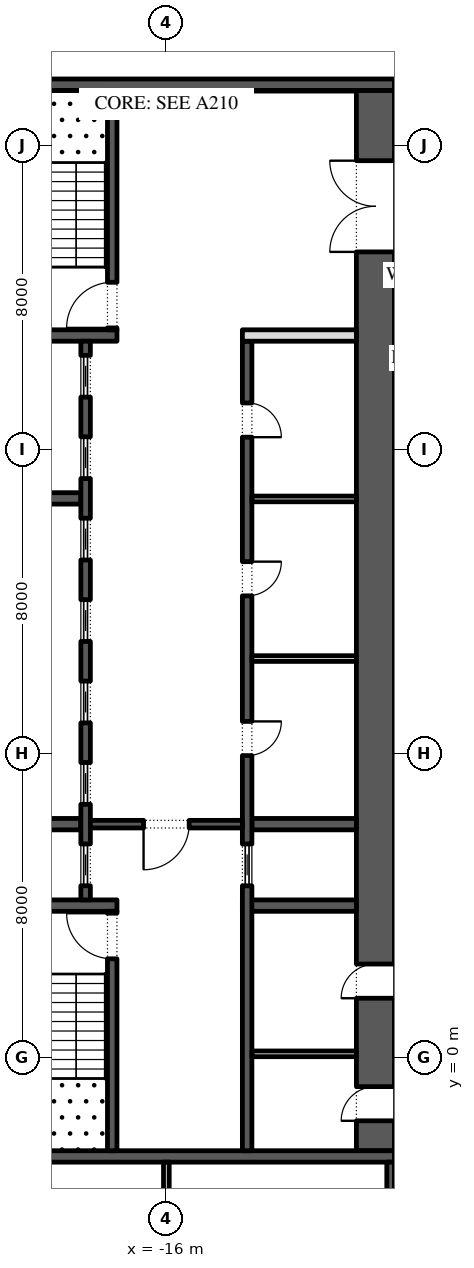
"""IFC4 building model, lengths in metres.
Left out: names, types, materials, properties, quantities, classifications, styles, units other than length and angle.
Written with IfcOpenShell. Run it as: python <this file> out.ifc"""

import sys

from ifc_helpers import new_model, si_unit, direction, frame, frame_2d, origin, place, context, subcontext, project, spatial, rectangle, extrude, element, fill, save


model = new_model("IFC4")
c1 = context("Model", 3, precision=1e-05, world=origin(), true_north=direction((0.0, 1.0)))
c2 = subcontext(c1, "Body", "Model", "MODEL_VIEW")
j1 = project(units=[si_unit("LENGTHUNIT", "METRE"), si_unit("PLANEANGLEUNIT", "RADIAN")], contexts=[c1])
p1 = place(None, origin())
s1 = spatial("IfcSite", under=j1, at=p1, CompositionType="ELEMENT")
p2 = place(p1, origin())
s2 = spatial("IfcBuilding", under=s1, at=p2, CompositionType="ELEMENT")
p3 = place(p2, frame((0.0, 0.0, 39.6)))
s3 = spatial("IfcBuildingStorey", under=s2, at=p3, CompositionType="ELEMENT", Elevation=39.6)
p4 = place(p3, frame((-10.5, -2.45, 0.0), z_axis=(0.0, 0.0, 1.0), x_axis=(0.0, 1.0, 0.0)))
e1 = element("IfcWall", 1, at=p4, inside=s3, PredefinedType="SHEAR", context=c2, shape_type="SweptSolid", body=[
    extrude(rectangle(XDim=27.9, YDim=1.0, at=frame_2d((13.95, 0.0))), origin(), (0.0, 0.0, 1.0), 4.0),
])
p5 = place(p4, frame((23.65, 0.0, 0.0)))
e2 = element("IfcOpeningElement", 2, at=p5, cuts=e1, PredefinedType="OPENING", context=c2, shape_type="SweptSolid", body=[
    extrude(rectangle(XDim=2.4, YDim=2.1, at=frame_2d((1.2, 1.05))), frame((0.0, 0.51, 0.0), z_axis=(0.0, -1.0, 0.0), x_axis=(1.0, 0.0, 0.0)), (0.0, 0.0, 1.0), 1.02),
])
p6 = place(p4, frame((0.788, 0.0, 0.0)))
e3 = element("IfcOpeningElement", 3, at=p6, cuts=e1, PredefinedType="OPENING", context=c2, shape_type="SweptSolid", body=[
    extrude(rectangle(XDim=0.9, YDim=2.1, at=frame_2d((0.45, 1.05))), frame((0.0, 0.51, 0.0), z_axis=(0.0, -1.0, 0.0), x_axis=(1.0, 0.0, 0.0)), (0.0, 0.0, 1.0), 1.02),
])
p7 = place(p4, frame((4.012, 0.0, 0.0)))
e4 = element("IfcOpeningElement", 4, at=p7, cuts=e1, PredefinedType="OPENING", context=c2, shape_type="SweptSolid", body=[
    extrude(rectangle(XDim=0.9, YDim=2.1, at=frame_2d((0.45, 1.05))), frame((0.0, 0.51, 0.0), z_axis=(0.0, -1.0, 0.0), x_axis=(1.0, 0.0, 0.0)), (0.0, 0.0, 1.0), 1.02),
])
for number, where, z_axis, x_axis in (
    (5, (-22.0, -2.6, 0.0), (0.0, 0.0, 1.0), (1.0, 0.0, 0.0)),
    (6, (-22.0, 25.6, 0.0), (0.0, 0.0, 1.0), (1.0, 0.0, 0.0)),
):
    element("IfcWall", number, at=place(p3, frame(where, z_axis=z_axis, x_axis=x_axis)), inside=s3, PredefinedType="SHEAR", context=c2, shape_type="SweptSolid", body=[
        extrude(rectangle(XDim=12.0, YDim=0.3, at=frame_2d((6.0, 0.0))), origin(), (0.0, 0.0, 1.0), 4.0),
    ])
p8 = place(p3, frame((-21.0, 4.0, 0.0), z_axis=(0.0, 0.0, 1.0), x_axis=(1.0, 0.0, 0.0)))
e7 = element("IfcWall", 7, at=p8, inside=s3, PredefinedType="SHEAR", context=c2, shape_type="SweptSolid", body=[
    extrude(rectangle(XDim=3.7, YDim=0.3, at=frame_2d((1.85, 0.0))), origin(), (0.0, 0.0, 1.0), 4.0),
])
p9 = place(p3, frame((-17.425, -2.45, 0.0), z_axis=(0.0, 0.0, 1.0), x_axis=(0.0, 1.0, 0.0)))
e8 = element("IfcWall", 8, at=p9, inside=s3, PredefinedType="SHEAR", context=c2, shape_type="SweptSolid", body=[
    extrude(rectangle(XDim=6.3, YDim=0.25, at=frame_2d((3.15, 0.0))), origin(), (0.0, 0.0, 1.0), 4.0),
])
p10 = place(p9, frame((5.05, 0.0, 0.0)))
e9 = element("IfcOpeningElement", 9, at=p10, cuts=e8, PredefinedType="OPENING", context=c2, shape_type="SweptSolid", body=[
    extrude(rectangle(XDim=1.2, YDim=2.1, at=frame_2d((0.6, 1.05))), frame((0.0, 0.135, 0.0), z_axis=(0.0, -1.0, 0.0), x_axis=(1.0, 0.0, 0.0)), (0.0, 0.0, 1.0), 0.27),
])
p11 = place(p3, frame((-21.0, 19.0, 0.0), z_axis=(0.0, 0.0, 1.0), x_axis=(1.0, 0.0, 0.0)))
e10 = element("IfcWall", 10, at=p11, inside=s3, PredefinedType="SHEAR", context=c2, shape_type="SweptSolid", body=[
    extrude(rectangle(XDim=3.7, YDim=0.3, at=frame_2d((1.85, 0.0))), origin(), (0.0, 0.0, 1.0), 4.0),
])
p12 = place(p3, frame((-17.425, 19.15, 0.0), z_axis=(0.0, 0.0, 1.0), x_axis=(0.0, 1.0, 0.0)))
e11 = element("IfcWall", 11, at=p12, inside=s3, PredefinedType="SHEAR", context=c2, shape_type="SweptSolid", body=[
    extrude(rectangle(XDim=6.3, YDim=0.25, at=frame_2d((3.15, 0.0))), origin(), (0.0, 0.0, 1.0), 4.0),
])
p13 = place(p12, frame((0.05, 0.0, 0.0)))
e12 = element("IfcOpeningElement", 12, at=p13, cuts=e11, PredefinedType="OPENING", context=c2, shape_type="SweptSolid", body=[
    extrude(rectangle(XDim=1.2, YDim=2.1, at=frame_2d((0.6, 1.05))), frame((0.0, 0.135, 0.0), z_axis=(0.0, -1.0, 0.0), x_axis=(1.0, 0.0, 0.0)), (0.0, 0.0, 1.0), 0.27),
])
for number, where, z_axis, x_axis in (
    (13, (-21.0, 6.143, 0.0), (0.0, 0.0, 1.0), (1.0, 0.0, 0.0)),
    (14, (-21.0, 14.714, 0.0), (0.0, 0.0, 1.0), (1.0, 0.0, 0.0)),
):
    element("IfcWall", number, at=place(p3, frame(where, z_axis=z_axis, x_axis=x_axis)), inside=s3, PredefinedType="SHEAR", context=c2, shape_type="SweptSolid", body=[
        extrude(rectangle(XDim=2.75, YDim=0.3, at=frame_2d((1.375, 0.0))), origin(), (0.0, 0.0, 1.0), 4.0),
    ])
p14 = place(p3, frame((-18.125, 4.15, 0.0), z_axis=(0.0, 0.0, 1.0), x_axis=(0.0, 1.0, 0.0)))
e15 = element("IfcWall", 15, at=p14, inside=s3, PredefinedType="SHEAR", context=c2, shape_type="SweptSolid", body=[
    extrude(rectangle(XDim=14.7, YDim=0.25, at=frame_2d((7.35, 0.0))), origin(), (0.0, 0.0, 1.0), 4.0),
])
p15 = place(p14, frame((0.371, 0.0, 0.0)))
e16 = element("IfcOpeningElement", 16, at=p15, cuts=e15, PredefinedType="OPENING", context=c2, shape_type="SweptSolid", body=[
    extrude(rectangle(XDim=1.1, YDim=2.1, at=frame_2d((0.55, 1.05))), frame((0.0, 0.135, 0.0), z_axis=(0.0, -1.0, 0.0), x_axis=(1.0, 0.0, 0.0)), (0.0, 0.0, 1.0), 0.27),
])
p16 = place(p14, frame((2.514, 0.0, 0.0)))
e17 = element("IfcOpeningElement", 17, at=p16, cuts=e15, PredefinedType="OPENING", context=c2, shape_type="SweptSolid", body=[
    extrude(rectangle(XDim=1.1, YDim=2.1, at=frame_2d((0.55, 1.05))), frame((0.0, 0.135, 0.0), z_axis=(0.0, -1.0, 0.0), x_axis=(1.0, 0.0, 0.0)), (0.0, 0.0, 1.0), 0.27),
])
p17 = place(p14, frame((4.657, 0.0, 0.0)))
e18 = element("IfcOpeningElement", 18, at=p17, cuts=e15, PredefinedType="OPENING", context=c2, shape_type="SweptSolid", body=[
    extrude(rectangle(XDim=1.1, YDim=2.1, at=frame_2d((0.55, 1.05))), frame((0.0, 0.135, 0.0), z_axis=(0.0, -1.0, 0.0), x_axis=(1.0, 0.0, 0.0)), (0.0, 0.0, 1.0), 0.27),
])
p18 = place(p14, frame((6.8, 0.0, 0.0)))
e19 = element("IfcOpeningElement", 19, at=p18, cuts=e15, PredefinedType="OPENING", context=c2, shape_type="SweptSolid", body=[
    extrude(rectangle(XDim=1.1, YDim=2.1, at=frame_2d((0.55, 1.05))), frame((0.0, 0.135, 0.0), z_axis=(0.0, -1.0, 0.0), x_axis=(1.0, 0.0, 0.0)), (0.0, 0.0, 1.0), 0.27),
])
p19 = place(p14, frame((8.943, 0.0, 0.0)))
e20 = element("IfcOpeningElement", 20, at=p19, cuts=e15, PredefinedType="OPENING", context=c2, shape_type="SweptSolid", body=[
    extrude(rectangle(XDim=1.1, YDim=2.1, at=frame_2d((0.55, 1.05))), frame((0.0, 0.135, 0.0), z_axis=(0.0, -1.0, 0.0), x_axis=(1.0, 0.0, 0.0)), (0.0, 0.0, 1.0), 0.27),
])
p20 = place(p14, frame((11.086, 0.0, 0.0)))
e21 = element("IfcOpeningElement", 21, at=p20, cuts=e15, PredefinedType="OPENING", context=c2, shape_type="SweptSolid", body=[
    extrude(rectangle(XDim=1.1, YDim=2.1, at=frame_2d((0.55, 1.05))), frame((0.0, 0.135, 0.0), z_axis=(0.0, -1.0, 0.0), x_axis=(1.0, 0.0, 0.0)), (0.0, 0.0, 1.0), 0.27),
])
p21 = place(p14, frame((13.229, 0.0, 0.0)))
e22 = element("IfcOpeningElement", 22, at=p21, cuts=e15, PredefinedType="OPENING", context=c2, shape_type="SweptSolid", body=[
    extrude(rectangle(XDim=1.1, YDim=2.1, at=frame_2d((0.55, 1.05))), frame((0.0, 0.135, 0.0), z_axis=(0.0, -1.0, 0.0), x_axis=(1.0, 0.0, 0.0)), (0.0, 0.0, 1.0), 0.27),
])
p22 = place(p3, frame((-14.0, 4.0, 0.0), z_axis=(0.0, 0.0, 1.0), x_axis=(1.0, 0.0, 0.0)))
e23 = element("IfcWall", 23, at=p22, inside=s3, PredefinedType="SHEAR", context=c2, shape_type="SweptSolid", body=[
    extrude(rectangle(XDim=3.0, YDim=0.3, at=frame_2d((1.5, 0.0))), origin(), (0.0, 0.0, 1.0), 4.0),
])
p23 = place(p3, frame((-13.75, 6.143, 0.0), z_axis=(0.0, 0.0, 1.0), x_axis=(1.0, 0.0, 0.0)))
e24 = element("IfcWall", 24, at=p23, inside=s3, PredefinedType="SHEAR", context=c2, shape_type="SweptSolid", body=[
    extrude(rectangle(XDim=2.75, YDim=0.3, at=frame_2d((1.375, 0.0))), origin(), (0.0, 0.0, 1.0), 4.0),
])
p24 = place(p3, frame((-13.875, -2.45, 0.0), z_axis=(0.0, 0.0, 1.0), x_axis=(0.0, 1.0, 0.0)))
e25 = element("IfcWall", 25, at=p24, inside=s3, PredefinedType="SHEAR", context=c2, shape_type="SweptSolid", body=[
    extrude(rectangle(XDim=21.3, YDim=0.25, at=frame_2d((10.65, 0.0))), origin(), (0.0, 0.0, 1.0), 4.0),
])
p25 = place(p24, frame((10.396, 0.0, 0.0)))
e26 = element("IfcOpeningElement", 26, at=p25, cuts=e25, PredefinedType="OPENING", context=c2, shape_type="SweptSolid", body=[
    extrude(rectangle(XDim=0.9, YDim=2.1, at=frame_2d((0.45, 1.05))), frame((0.0, 0.135, 0.0), z_axis=(0.0, -1.0, 0.0), x_axis=(1.0, 0.0, 0.0)), (0.0, 0.0, 1.0), 0.27),
])
p26 = place(p24, frame((14.6, 0.0, 0.0)))
e27 = element("IfcOpeningElement", 27, at=p26, cuts=e25, PredefinedType="OPENING", context=c2, shape_type="SweptSolid", body=[
    extrude(rectangle(XDim=0.9, YDim=2.1, at=frame_2d((0.45, 1.05))), frame((0.0, 0.135, 0.0), z_axis=(0.0, -1.0, 0.0), x_axis=(1.0, 0.0, 0.0)), (0.0, 0.0, 1.0), 0.27),
])
p27 = place(p24, frame((18.775, 0.0, 0.0)))
e28 = element("IfcOpeningElement", 28, at=p27, cuts=e25, PredefinedType="OPENING", context=c2, shape_type="SweptSolid", body=[
    extrude(rectangle(XDim=0.9, YDim=2.1, at=frame_2d((0.45, 1.05))), frame((0.0, 0.135, 0.0), z_axis=(0.0, -1.0, 0.0), x_axis=(1.0, 0.0, 0.0)), (0.0, 0.0, 1.0), 0.27),
])
p28 = place(p24, frame((6.971, 0.0, 0.0)))
e29 = element("IfcOpeningElement", 29, at=p28, cuts=e25, PredefinedType="OPENING", context=c2, shape_type="SweptSolid", body=[
    extrude(rectangle(XDim=1.1, YDim=2.1, at=frame_2d((0.55, 1.05))), frame((0.0, 0.135, 0.0), z_axis=(0.0, -1.0, 0.0), x_axis=(1.0, 0.0, 0.0)), (0.0, 0.0, 1.0), 0.27),
])
p29 = place(p3, frame((-14.0, 19.0, 0.0), z_axis=(0.0, 0.0, 1.0), x_axis=(1.0, 0.0, 0.0)))
e30 = element("IfcWall", 30, at=p29, inside=s3, PredefinedType="PARTITIONING", context=c2, shape_type="SweptSolid", body=[
    extrude(rectangle(XDim=3.0, YDim=0.3, at=frame_2d((1.5, 0.0))), origin(), (0.0, 0.0, 1.0), 4.0),
])
for number, where, z_axis, x_axis in (
    (31, (-13.75, 10.5, 0.0), (0.0, 0.0, 1.0), (1.0, 0.0, 0.0)),
    (32, (-13.75, 14.7, 0.0), (0.0, 0.0, 1.0), (1.0, 0.0, 0.0)),
):
    element("IfcWall", number, at=place(p3, frame(where, z_axis=z_axis, x_axis=x_axis)), inside=s3, PredefinedType="PARTITIONING", context=c2, shape_type="SweptSolid", body=[
        extrude(rectangle(XDim=2.75, YDim=0.15, at=frame_2d((1.375, 0.0))), origin(), (0.0, 0.0, 1.0), 4.0),
    ])
p30 = place(p3, frame((-18.0, 6.143, 0.0), z_axis=(0.0, 0.0, 1.0), x_axis=(1.0, 0.0, 0.0)))
e33 = element("IfcWall", 33, at=p30, inside=s3, PredefinedType="SHEAR", context=c2, shape_type="SweptSolid", body=[
    extrude(rectangle(XDim=4.0, YDim=0.2, at=frame_2d((2.0, 0.0))), origin(), (0.0, 0.0, 1.0), 4.0),
])
p31 = place(p30, frame((1.4, 0.0, 0.0)))
e34 = element("IfcOpeningElement", 34, at=p31, cuts=e33, PredefinedType="OPENING", context=c2, shape_type="SweptSolid", body=[
    extrude(rectangle(XDim=1.2, YDim=2.1, at=frame_2d((0.6, 1.05))), frame((0.0, 0.11, 0.0), z_axis=(0.0, -1.0, 0.0), x_axis=(1.0, 0.0, 0.0)), (0.0, 0.0, 1.0), 0.22),
])
p32 = place(p3, frame((-13.75, 0.1, 0.0), z_axis=(0.0, 0.0, 1.0), x_axis=(1.0, 0.0, 0.0)))
e35 = element("IfcWall", 35, at=p32, inside=s3, PredefinedType="PARTITIONING", context=c2, shape_type="SweptSolid", body=[
    extrude(rectangle(XDim=2.75, YDim=0.15, at=frame_2d((1.375, 0.0))), origin(), (0.0, 0.0, 1.0), 4.0),
])
p33 = place(p3, frame((-10.1, -15.8, 0.0), z_axis=(0.0, 0.0, 1.0), x_axis=(0.0, 1.0, 0.0)))
e36 = element("IfcWall", 36, at=p33, inside=s3, PredefinedType="SHEAR", context=c2, shape_type="SweptSolid", body=[
    extrude(rectangle(XDim=13.05, YDim=0.2, at=frame_2d((6.525, 0.0))), origin(), (0.0, 0.0, 1.0), 4.0),
])
p34 = place(p33, frame((6.075, 0.0, 0.0)))
e37 = element("IfcOpeningElement", 37, at=p34, cuts=e36, PredefinedType="OPENING", context=c2, shape_type="SweptSolid", body=[
    extrude(rectangle(XDim=0.9, YDim=2.1, at=frame_2d((0.45, 1.05))), frame((0.0, 0.11, 0.0), z_axis=(0.0, -1.0, 0.0), x_axis=(1.0, 0.0, 0.0)), (0.0, 0.0, 1.0), 0.22),
])
p35 = place(p3, frame((-16.0, -15.8, 0.0), z_axis=(0.0, 0.0, 1.0), x_axis=(0.0, 1.0, 0.0)))
e38 = element("IfcWall", 38, at=p35, inside=s3, PredefinedType="PARTITIONING", context=c2, shape_type="SweptSolid", body=[
    extrude(rectangle(XDim=13.05, YDim=0.15, at=frame_2d((6.525, 0.0))), origin(), (0.0, 0.0, 1.0), 4.0),
])
p36 = place(p35, frame((11.087, 0.0, 0.0)))
e39 = element("IfcOpeningElement", 39, at=p36, cuts=e38, PredefinedType="OPENING", context=c2, shape_type="SweptSolid", body=[
    extrude(rectangle(XDim=0.9, YDim=2.1, at=frame_2d((0.45, 1.05))), frame((0.0, 0.085, 0.0), z_axis=(0.0, -1.0, 0.0), x_axis=(1.0, 0.0, 0.0)), (0.0, 0.0, 1.0), 0.17),
])
p37 = place(p3, frame((-10.0, 19.0, 0.0), z_axis=(0.0, 0.0, 1.0), x_axis=(1.0, 0.0, 0.0)))
e40 = element("IfcWall", 40, at=p37, inside=s3, PredefinedType="PARTITIONING", context=c2, shape_type="SweptSolid", body=[
    extrude(rectangle(XDim=1.515, YDim=0.15, at=frame_2d((0.757, 0.0))), origin(), (0.0, 0.0, 1.0), 4.0),
])
p38 = place(p37, frame((0.258, 0.0, 0.0)))
e41 = element("IfcOpeningElement", 41, at=p38, cuts=e40, PredefinedType="OPENING", context=c2, shape_type="SweptSolid", body=[
    extrude(rectangle(XDim=1.0, YDim=2.1, at=frame_2d((0.5, 1.05))), frame((0.0, 0.085, 0.0), z_axis=(0.0, -1.0, 0.0), x_axis=(1.0, 0.0, 0.0)), (0.0, 0.0, 1.0), 0.17),
])
p39 = place(p15, origin())
e42 = element("IfcDoor", 42, at=p39, inside=s3, OperationType="SLIDING_TO_LEFT", PredefinedType="DOOR", context=c2, shape_type="SweptSolid", body=[
    extrude(rectangle(XDim=1.1, YDim=2.1, at=frame_2d((0.55, 1.05))), frame((0.0, 0.025, 0.0), z_axis=(0.0, -1.0, 0.0), x_axis=(1.0, 0.0, 0.0)), (0.0, 0.0, 1.0), 0.05),
])
fill(e16, e42)
p40 = place(p16, origin())
e43 = element("IfcDoor", 43, at=p40, inside=s3, OperationType="SLIDING_TO_LEFT", PredefinedType="DOOR", context=c2, shape_type="SweptSolid", body=[
    extrude(rectangle(XDim=1.1, YDim=2.1, at=frame_2d((0.55, 1.05))), frame((0.0, 0.025, 0.0), z_axis=(0.0, -1.0, 0.0), x_axis=(1.0, 0.0, 0.0)), (0.0, 0.0, 1.0), 0.05),
])
fill(e17, e43)
p41 = place(p17, origin())
e44 = element("IfcDoor", 44, at=p41, inside=s3, OperationType="SLIDING_TO_LEFT", PredefinedType="DOOR", context=c2, shape_type="SweptSolid", body=[
    extrude(rectangle(XDim=1.1, YDim=2.1, at=frame_2d((0.55, 1.05))), frame((0.0, 0.025, 0.0), z_axis=(0.0, -1.0, 0.0), x_axis=(1.0, 0.0, 0.0)), (0.0, 0.0, 1.0), 0.05),
])
fill(e18, e44)
p42 = place(p18, origin())
e45 = element("IfcDoor", 45, at=p42, inside=s3, OperationType="SLIDING_TO_LEFT", PredefinedType="DOOR", context=c2, shape_type="SweptSolid", body=[
    extrude(rectangle(XDim=1.1, YDim=2.1, at=frame_2d((0.55, 1.05))), frame((0.0, 0.025, 0.0), z_axis=(0.0, -1.0, 0.0), x_axis=(1.0, 0.0, 0.0)), (0.0, 0.0, 1.0), 0.05),
])
fill(e19, e45)
p43 = place(p19, origin())
e46 = element("IfcDoor", 46, at=p43, inside=s3, OperationType="SLIDING_TO_LEFT", PredefinedType="DOOR", context=c2, shape_type="SweptSolid", body=[
    extrude(rectangle(XDim=1.1, YDim=2.1, at=frame_2d((0.55, 1.05))), frame((0.0, 0.025, 0.0), z_axis=(0.0, -1.0, 0.0), x_axis=(1.0, 0.0, 0.0)), (0.0, 0.0, 1.0), 0.05),
])
fill(e20, e46)
p44 = place(p20, origin())
e47 = element("IfcDoor", 47, at=p44, inside=s3, OperationType="SLIDING_TO_LEFT", PredefinedType="DOOR", context=c2, shape_type="SweptSolid", body=[
    extrude(rectangle(XDim=1.1, YDim=2.1, at=frame_2d((0.55, 1.05))), frame((0.0, 0.025, 0.0), z_axis=(0.0, -1.0, 0.0), x_axis=(1.0, 0.0, 0.0)), (0.0, 0.0, 1.0), 0.05),
])
fill(e21, e47)
p45 = place(p21, origin())
e48 = element("IfcDoor", 48, at=p45, inside=s3, OperationType="SLIDING_TO_LEFT", PredefinedType="DOOR", context=c2, shape_type="SweptSolid", body=[
    extrude(rectangle(XDim=1.1, YDim=2.1, at=frame_2d((0.55, 1.05))), frame((0.0, 0.025, 0.0), z_axis=(0.0, -1.0, 0.0), x_axis=(1.0, 0.0, 0.0)), (0.0, 0.0, 1.0), 0.05),
])
fill(e22, e48)
p46 = place(p25, frame((0.9, -0.2, 0.0), z_axis=(0.0, 0.0, 1.0), x_axis=(-1.0, 0.0, 0.0)))
e49 = element("IfcDoor", 49, at=p46, inside=s3, OperationType="SINGLE_SWING_RIGHT", PredefinedType="DOOR", context=c2, shape_type="SweptSolid", body=[
    extrude(rectangle(XDim=0.9, YDim=2.1, at=frame_2d((0.45, 1.05))), frame((0.0, -0.075, 0.0), z_axis=(0.0, -1.0, 0.0), x_axis=(1.0, 0.0, 0.0)), (0.0, 0.0, 1.0), 0.05),
])
fill(e26, e49)
p47 = place(p26, frame((0.9, -0.2, 0.0), z_axis=(0.0, 0.0, 1.0), x_axis=(-1.0, 0.0, 0.0)))
e50 = element("IfcDoor", 50, at=p47, inside=s3, OperationType="SINGLE_SWING_RIGHT", PredefinedType="DOOR", context=c2, shape_type="SweptSolid", body=[
    extrude(rectangle(XDim=0.9, YDim=2.1, at=frame_2d((0.45, 1.05))), frame((0.0, -0.075, 0.0), z_axis=(0.0, -1.0, 0.0), x_axis=(1.0, 0.0, 0.0)), (0.0, 0.0, 1.0), 0.05),
])
fill(e27, e50)
p48 = place(p27, frame((0.9, -0.2, 0.0), z_axis=(0.0, 0.0, 1.0), x_axis=(-1.0, 0.0, 0.0)))
e51 = element("IfcDoor", 51, at=p48, inside=s3, OperationType="SINGLE_SWING_LEFT", PredefinedType="DOOR", context=c2, shape_type="SweptSolid", body=[
    extrude(rectangle(XDim=0.9, YDim=2.1, at=frame_2d((0.45, 1.05))), frame((0.0, -0.075, 0.0), z_axis=(0.0, -1.0, 0.0), x_axis=(1.0, 0.0, 0.0)), (0.0, 0.0, 1.0), 0.05),
])
fill(e28, e51)
p49 = place(p28, origin())
e52 = element("IfcDoor", 52, at=p49, inside=s3, OperationType="SLIDING_TO_LEFT", PredefinedType="DOOR", context=c2, shape_type="SweptSolid", body=[
    extrude(rectangle(XDim=1.1, YDim=2.1, at=frame_2d((0.55, 1.05))), frame((0.0, 0.025, 0.0), z_axis=(0.0, -1.0, 0.0), x_axis=(1.0, 0.0, 0.0)), (0.0, 0.0, 1.0), 0.05),
])
fill(e29, e52)
p50 = place(p31, frame((1.2, 0.0, 0.0), z_axis=(0.0, 0.0, 1.0), x_axis=(-1.0, 0.0, 0.0)))
e53 = element("IfcDoor", 53, at=p50, inside=s3, OperationType="SINGLE_SWING_LEFT", PredefinedType="DOOR", context=c2, shape_type="SweptSolid", body=[
    extrude(rectangle(XDim=1.2, YDim=2.1, at=frame_2d((0.6, 1.05))), frame((0.0, 0.025, 0.0), z_axis=(0.0, -1.0, 0.0), x_axis=(1.0, 0.0, 0.0)), (0.0, 0.0, 1.0), 0.05),
])
fill(e34, e53)
p51 = place(p5, origin())
e54 = element("IfcDoor", 54, at=p51, inside=s3, OperationType="DOUBLE_DOOR_SINGLE_SWING", PredefinedType="DOOR", context=c2, shape_type="SweptSolid", body=[
    extrude(rectangle(XDim=2.4, YDim=2.1, at=frame_2d((1.2, 1.05))), frame((0.0, 0.025, 0.0), z_axis=(0.0, -1.0, 0.0), x_axis=(1.0, 0.0, 0.0)), (0.0, 0.0, 1.0), 0.05),
])
fill(e2, e54)
p52 = place(p10, origin())
e55 = element("IfcDoor", 55, at=p52, inside=s3, OperationType="SINGLE_SWING_LEFT", PredefinedType="DOOR", context=c2, shape_type="SweptSolid", body=[
    extrude(rectangle(XDim=1.2, YDim=2.1, at=frame_2d((0.6, 1.05))), frame((0.0, 0.025, 0.0), z_axis=(0.0, -1.0, 0.0), x_axis=(1.0, 0.0, 0.0)), (0.0, 0.0, 1.0), 0.05),
])
fill(e9, e55)
p53 = place(p13, origin())
e56 = element("IfcDoor", 56, at=p53, inside=s3, OperationType="SINGLE_SWING_RIGHT", PredefinedType="DOOR", context=c2, shape_type="SweptSolid", body=[
    extrude(rectangle(XDim=1.2, YDim=2.1, at=frame_2d((0.6, 1.05))), frame((0.0, 0.025, 0.0), z_axis=(0.0, -1.0, 0.0), x_axis=(1.0, 0.0, 0.0)), (0.0, 0.0, 1.0), 0.05),
])
fill(e12, e56)
p54 = place(p6, origin())
e57 = element("IfcDoor", 57, at=p54, inside=s3, OperationType="SINGLE_SWING_RIGHT", PredefinedType="DOOR", context=c2, shape_type="SweptSolid", body=[
    extrude(rectangle(XDim=0.9, YDim=2.1, at=frame_2d((0.45, 1.05))), frame((0.0, 0.5, 0.0), z_axis=(0.0, -1.0, 0.0), x_axis=(1.0, 0.0, 0.0)), (0.0, 0.0, 1.0), 0.05),
])
fill(e3, e57)
p55 = place(p7, origin())
e58 = element("IfcDoor", 58, at=p55, inside=s3, OperationType="SINGLE_SWING_RIGHT", PredefinedType="DOOR", context=c2, shape_type="SweptSolid", body=[
    extrude(rectangle(XDim=0.9, YDim=2.1, at=frame_2d((0.45, 1.05))), frame((0.0, 0.5, 0.0), z_axis=(0.0, -1.0, 0.0), x_axis=(1.0, 0.0, 0.0)), (0.0, 0.0, 1.0), 0.05),
])
fill(e4, e58)
save(model, sys.argv[1])
